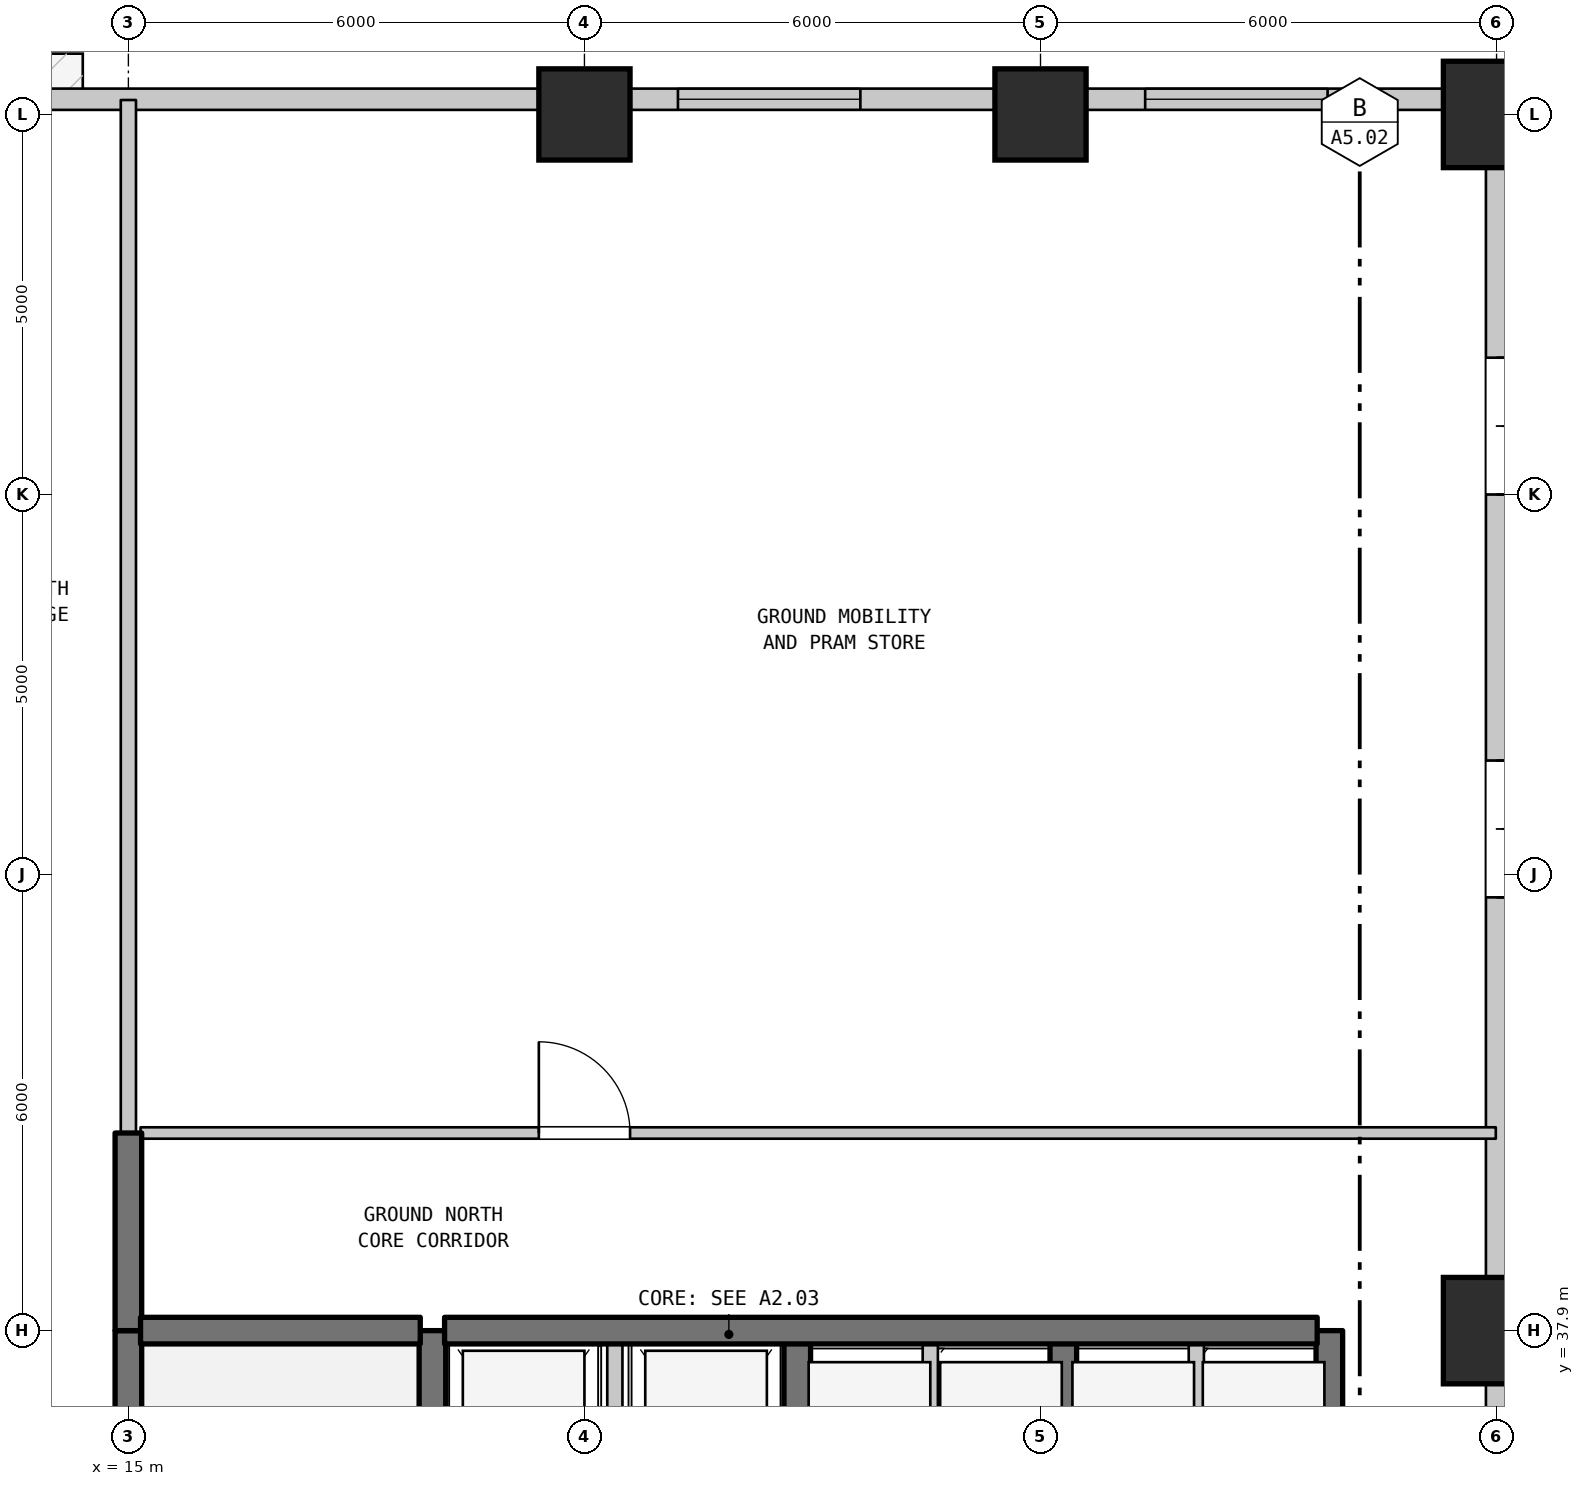
"""IFC4 building model, lengths in metres.
Left out: names, types, materials, properties, quantities, classifications, styles, units other than length and angle.
Written with IfcOpenShell. Run it as: python <this file> out.ifc"""

import sys

from ifc_helpers import new_model, si_unit, direction, frame, frame_2d, origin, origin_2d, place, context, subcontext, project, spatial, rectangle, extrude, element, fill, save


model = new_model("IFC4")
c1 = context("Model", 3, precision=1e-05, world=origin(), true_north=direction((0.0, 1.0)))
c2 = subcontext(c1, "Body", "Model", "MODEL_VIEW")
j1 = project(units=[si_unit("LENGTHUNIT", "METRE"), si_unit("PLANEANGLEUNIT", "RADIAN")], contexts=[c1])
p1 = place(None, origin())
s1 = spatial("IfcSite", under=j1, at=p1, CompositionType="ELEMENT")
p2 = place(p1, origin())
s2 = spatial("IfcBuilding", under=s1, at=p2, CompositionType="ELEMENT")
p3 = place(p2, origin())
s3 = spatial("IfcBuildingStorey", under=s2, at=p3, CompositionType="ELEMENT", Elevation=0.0)
for number, where, z_axis, x_axis in (
    (1, (21.0, 53.9, 0.0), (0.0, 0.0, 1.0), (1.0, 0.0, 0.0)),
    (2, (27.0, 53.9, 0.0), (0.0, 0.0, 1.0), (1.0, 0.0, 0.0)),
):
    element("IfcColumn", number, at=place(p3, frame(where, z_axis=z_axis, x_axis=x_axis)), inside=s3, PredefinedType="PILASTER", context=c2, shape_type="SweptSolid", body=[
        extrude(rectangle(XDim=1.2, YDim=1.2, at=origin_2d()), origin(), (0.0, 0.0, 1.0), 6.5),
    ])
for number, where, z_axis, x_axis in (
    (3, (33.0, 37.9, 0.0), (0.0, 0.0, 1.0), (1.0, 0.0, 0.0)),
    (4, (33.0, 53.9, 0.0), (0.0, 0.0, 1.0), (1.0, 0.0, 0.0)),
):
    element("IfcColumn", number, at=place(p3, frame(where, z_axis=z_axis, x_axis=x_axis)), inside=s3, PredefinedType="PILASTER", context=c2, shape_type="SweptSolid", body=[
        extrude(rectangle(XDim=1.4, YDim=1.4, at=origin_2d()), origin(), (0.0, 0.0, 1.0), 6.5),
    ])
p4 = place(p3, frame((4.414, 54.1, 0.0), z_axis=(0.0, 0.0, 1.0), x_axis=(1.0, 0.0, 0.0)))
e5 = element("IfcWall", 5, at=p4, inside=s3, PredefinedType="STANDARD", context=c2, shape_type="SweptSolid", body=[
    extrude(rectangle(XDim=28.586, YDim=0.28, at=frame_2d((14.293, 0.0))), origin(), (0.0, 0.0, 1.0), 6.17),
])
p5 = place(p4, frame((7.586, 0.0, 0.0)))
e6 = element("IfcOpeningElement", 6, at=p5, cuts=e5, PredefinedType="OPENING", context=c2, shape_type="SweptSolid", body=[
    extrude(rectangle(XDim=1.8, YDim=2.4, at=frame_2d((0.9, 1.2))), frame((0.0, 0.15, 0.0), z_axis=(0.0, -1.0, 0.0), x_axis=(1.0, 0.0, 0.0)), (0.0, 0.0, 1.0), 0.3),
])
p6 = place(p4, frame((2.673, 0.0, 0.9)))
e7 = element("IfcOpeningElement", 7, at=p6, cuts=e5, PredefinedType="OPENING", context=c2, shape_type="SweptSolid", body=[
    extrude(rectangle(XDim=2.4, YDim=2.4, at=frame_2d((1.2, 1.2))), frame((0.0, 0.15, 0.0), z_axis=(0.0, -1.0, 0.0), x_axis=(1.0, 0.0, 0.0)), (0.0, 0.0, 1.0), 0.3),
])
p7 = place(p4, frame((17.816, 0.0, 0.9)))
e8 = element("IfcOpeningElement", 8, at=p7, cuts=e5, PredefinedType="OPENING", context=c2, shape_type="SweptSolid", body=[
    extrude(rectangle(XDim=2.4, YDim=2.4, at=frame_2d((1.2, 1.2))), frame((0.0, 0.15, 0.0), z_axis=(0.0, -1.0, 0.0), x_axis=(1.0, 0.0, 0.0)), (0.0, 0.0, 1.0), 0.3),
])
p8 = place(p4, frame((23.963, 0.0, 0.9)))
e9 = element("IfcOpeningElement", 9, at=p8, cuts=e5, PredefinedType="OPENING", context=c2, shape_type="SweptSolid", body=[
    extrude(rectangle(XDim=2.4, YDim=2.4, at=frame_2d((1.2, 1.2))), frame((0.0, 0.15, 0.0), z_axis=(0.0, -1.0, 0.0), x_axis=(1.0, 0.0, 0.0)), (0.0, 0.0, 1.0), 0.3),
])
p9 = place(p3, frame((33.0, 54.1, 0.0), z_axis=(0.0, 0.0, 1.0), x_axis=(0.0, -1.0, 0.0)))
e10 = element("IfcWall", 10, at=p9, inside=s3, PredefinedType="STANDARD", context=c2, shape_type="SweptSolid", body=[
    extrude(rectangle(XDim=26.2, YDim=0.28, at=frame_2d((13.1, 0.0))), origin(), (0.0, 0.0, 1.0), 5.57),
])
p10 = place(p9, frame((8.7, 0.0, 0.0)))
e11 = element("IfcOpeningElement", 11, at=p10, cuts=e10, PredefinedType="OPENING", context=c2, shape_type="SweptSolid", body=[
    extrude(rectangle(XDim=1.8, YDim=2.4, at=frame_2d((0.9, 1.2))), frame((0.0, 0.15, 0.0), z_axis=(0.0, -1.0, 0.0), x_axis=(1.0, 0.0, 0.0)), (0.0, 0.0, 1.0), 0.3),
])
p11 = place(p9, frame((3.4, 0.0, 0.0)))
e12 = element("IfcOpeningElement", 12, at=p11, cuts=e10, PredefinedType="OPENING", context=c2, shape_type="SweptSolid", body=[
    extrude(rectangle(XDim=1.8, YDim=2.4, at=frame_2d((0.9, 1.2))), frame((0.0, 0.15, 0.0), z_axis=(0.0, -1.0, 0.0), x_axis=(1.0, 0.0, 0.0)), (0.0, 0.0, 1.0), 0.3),
])
p12 = place(p9, frame((22.212, 0.0, 0.9)))
e13 = element("IfcOpeningElement", 13, at=p12, cuts=e10, PredefinedType="OPENING", context=c2, shape_type="SweptSolid", body=[
    extrude(rectangle(XDim=2.4, YDim=2.4, at=frame_2d((1.2, 1.2))), frame((0.0, 0.15, 0.0), z_axis=(0.0, -1.0, 0.0), x_axis=(1.0, 0.0, 0.0)), (0.0, 0.0, 1.0), 0.3),
])
p13 = place(p3, frame((15.0, 31.1, 0.0), z_axis=(0.0, 0.0, 1.0), x_axis=(0.0, 1.0, 0.0)))
e14 = element("IfcWall", 14, at=p13, inside=s3, PredefinedType="SHEAR", context=c2, shape_type="SweptSolid", body=[
    extrude(rectangle(XDim=6.8, YDim=0.35, at=frame_2d((3.4, 0.0))), origin(), (0.0, 0.0, 1.0), 6.17),
])
p14 = place(p13, frame((0.632, 0.0, 0.0)))
e15 = element("IfcOpeningElement", 15, at=p14, cuts=e14, PredefinedType="OPENING", context=c2, shape_type="SweptSolid", body=[
    extrude(rectangle(XDim=1.1, YDim=2.15, at=frame_2d((0.55, 1.075))), frame((0.0, 0.185, 0.0), z_axis=(0.0, -1.0, 0.0), x_axis=(1.0, 0.0, 0.0)), (0.0, 0.0, 1.0), 0.37),
])
p15 = place(p3, frame((15.0, 37.9, 0.0), z_axis=(0.0, 0.0, 1.0), x_axis=(0.0, 1.0, 0.0)))
e16 = element("IfcWall", 16, at=p15, inside=s3, PredefinedType="SHEAR", context=c2, shape_type="SweptSolid", body=[
    extrude(rectangle(XDim=2.6, YDim=0.35, at=frame_2d((1.3, 0.0))), origin(), (0.0, 0.0, 1.0), 6.17),
])
p16 = place(p3, frame((15.0, 40.5, 0.0), z_axis=(0.0, 0.0, 1.0), x_axis=(0.0, 1.0, 0.0)))
e17 = element("IfcWall", 17, at=p16, inside=s3, PredefinedType="STANDARD", context=c2, shape_type="SweptSolid", body=[
    extrude(rectangle(XDim=13.59, YDim=0.2, at=frame_2d((6.795, 0.0))), origin(), (0.0, 0.0, 1.0), 6.17),
])
p17 = place(p3, frame((19.0, 35.0, 0.0), z_axis=(0.0, 0.0, 1.0), x_axis=(0.0, 1.0, 0.0)))
e18 = element("IfcWall", 18, at=p17, inside=s3, PredefinedType="SHEAR", context=c2, shape_type="SweptSolid", body=[
    extrude(rectangle(XDim=2.9, YDim=0.35, at=frame_2d((1.45, 0.0))), origin(), (0.0, 0.0, 1.0), 6.17),
])
p18 = place(p3, frame((21.4, 35.0, 0.0), z_axis=(0.0, 0.0, 1.0), x_axis=(0.0, 1.0, 0.0)))
e19 = element("IfcWall", 19, at=p18, inside=s3, PredefinedType="STANDARD", context=c2, shape_type="SweptSolid", body=[
    extrude(rectangle(XDim=2.9, YDim=0.2, at=frame_2d((1.45, 0.0))), origin(), (0.0, 0.0, 1.0), 6.17),
])
p19 = place(p3, frame((23.8, 35.0, 0.0), z_axis=(0.0, 0.0, 1.0), x_axis=(0.0, 1.0, 0.0)))
e20 = element("IfcWall", 20, at=p19, inside=s3, PredefinedType="SHEAR", context=c2, shape_type="SweptSolid", body=[
    extrude(rectangle(XDim=2.9, YDim=0.35, at=frame_2d((1.45, 0.0))), origin(), (0.0, 0.0, 1.0), 6.17),
])
p20 = place(p3, frame((25.55, 35.0, 0.0), z_axis=(0.0, 0.0, 1.0), x_axis=(0.0, 1.0, 0.0)))
e21 = element("IfcWall", 21, at=p20, inside=s3, PredefinedType="STANDARD", context=c2, shape_type="SweptSolid", body=[
    extrude(rectangle(XDim=2.9, YDim=0.2, at=frame_2d((1.45, 0.0))), origin(), (0.0, 0.0, 1.0), 6.17),
])
p21 = place(p3, frame((27.3, 35.0, 0.0), z_axis=(0.0, 0.0, 1.0), x_axis=(0.0, 1.0, 0.0)))
e22 = element("IfcWall", 22, at=p21, inside=s3, PredefinedType="SHEAR", context=c2, shape_type="SweptSolid", body=[
    extrude(rectangle(XDim=2.9, YDim=0.35, at=frame_2d((1.45, 0.0))), origin(), (0.0, 0.0, 1.0), 6.17),
])
p22 = place(p3, frame((29.05, 35.0, 0.0), z_axis=(0.0, 0.0, 1.0), x_axis=(0.0, 1.0, 0.0)))
e23 = element("IfcWall", 23, at=p22, inside=s3, PredefinedType="STANDARD", context=c2, shape_type="SweptSolid", body=[
    extrude(rectangle(XDim=2.9, YDim=0.2, at=frame_2d((1.45, 0.0))), origin(), (0.0, 0.0, 1.0), 6.17),
])
p23 = place(p3, frame((30.8, 35.0, 0.0), z_axis=(0.0, 0.0, 1.0), x_axis=(0.0, 1.0, 0.0)))
e24 = element("IfcWall", 24, at=p23, inside=s3, PredefinedType="SHEAR", context=c2, shape_type="SweptSolid", body=[
    extrude(rectangle(XDim=2.9, YDim=0.35, at=frame_2d((1.45, 0.0))), origin(), (0.0, 0.0, 1.0), 6.17),
])
p24 = place(p3, frame((15.16, 37.9, 0.0), z_axis=(0.0, 0.0, 1.0), x_axis=(1.0, 0.0, 0.0)))
e25 = element("IfcWall", 25, at=p24, inside=s3, PredefinedType="SHEAR", context=c2, shape_type="SweptSolid", body=[
    extrude(rectangle(XDim=3.68, YDim=0.35, at=frame_2d((1.84, 0.0))), origin(), (0.0, 0.0, 1.0), 6.17),
])
p25 = place(p3, frame((19.16, 37.9, 0.0), z_axis=(0.0, 0.0, 1.0), x_axis=(1.0, 0.0, 0.0)))
e26 = element("IfcWall", 26, at=p25, inside=s3, PredefinedType="SHEAR", context=c2, shape_type="SweptSolid", body=[
    extrude(rectangle(XDim=11.48, YDim=0.35, at=frame_2d((5.74, 0.0))), origin(), (0.0, 0.0, 1.0), 6.17),
])
p26 = place(p3, frame((15.16, 40.5, 0.0), z_axis=(0.0, 0.0, 1.0), x_axis=(1.0, 0.0, 0.0)))
e27 = element("IfcWall", 27, at=p26, inside=s3, PredefinedType="STANDARD", context=c2, shape_type="SweptSolid", body=[
    extrude(rectangle(XDim=17.83, YDim=0.15, at=frame_2d((8.915, 0.0))), origin(), (0.0, 0.0, 1.0), 6.17),
])
p27 = place(p26, frame((5.24, 0.0, 0.0)))
e28 = element("IfcOpeningElement", 28, at=p27, cuts=e27, PredefinedType="OPENING", context=c2, shape_type="SweptSolid", body=[
    extrude(rectangle(XDim=1.2, YDim=2.2, at=frame_2d((0.6, 1.1))), frame((0.0, 0.085, 0.0), z_axis=(0.0, -1.0, 0.0), x_axis=(1.0, 0.0, 0.0)), (0.0, 0.0, 1.0), 0.17),
])
p28 = place(p7, origin())
e29 = element("IfcWindow", 29, at=p28, inside=s3, PartitioningType="DOUBLE_PANEL_VERTICAL", PredefinedType="WINDOW", context=c2, shape_type="SweptSolid", body=[
    extrude(rectangle(XDim=2.4, YDim=2.4, at=frame_2d((1.2, 1.2))), frame((0.0, 0.03, 0.0), z_axis=(0.0, -1.0, 0.0), x_axis=(1.0, 0.0, 0.0)), (0.0, 0.0, 1.0), 0.06),
])
fill(e8, e29)
p29 = place(p8, origin())
e30 = element("IfcWindow", 30, at=p29, inside=s3, PartitioningType="DOUBLE_PANEL_VERTICAL", PredefinedType="WINDOW", context=c2, shape_type="SweptSolid", body=[
    extrude(rectangle(XDim=2.4, YDim=2.4, at=frame_2d((1.2, 1.2))), frame((0.0, 0.03, 0.0), z_axis=(0.0, -1.0, 0.0), x_axis=(1.0, 0.0, 0.0)), (0.0, 0.0, 1.0), 0.06),
])
fill(e9, e30)
p30 = place(p10, origin())
e31 = element("IfcDoor", 31, at=p30, inside=s3, OperationType="DOUBLE_DOOR_SINGLE_SWING", PredefinedType="DOOR", context=c2, shape_type="SweptSolid", body=[
    extrude(rectangle(XDim=1.8, YDim=2.4, at=frame_2d((0.9, 1.2))), frame((0.0, 0.025, 0.0), z_axis=(0.0, -1.0, 0.0), x_axis=(1.0, 0.0, 0.0)), (0.0, 0.0, 1.0), 0.05),
])
fill(e11, e31)
p31 = place(p11, origin())
e32 = element("IfcDoor", 32, at=p31, inside=s3, OperationType="DOUBLE_DOOR_SINGLE_SWING", PredefinedType="DOOR", context=c2, shape_type="SweptSolid", body=[
    extrude(rectangle(XDim=1.8, YDim=2.4, at=frame_2d((0.9, 1.2))), frame((0.0, 0.025, 0.0), z_axis=(0.0, -1.0, 0.0), x_axis=(1.0, 0.0, 0.0)), (0.0, 0.0, 1.0), 0.05),
])
fill(e12, e32)
p32 = place(p27, origin())
e33 = element("IfcDoor", 33, at=p32, inside=s3, OperationType="SINGLE_SWING_LEFT", PredefinedType="DOOR", context=c2, shape_type="SweptSolid", body=[
    extrude(rectangle(XDim=1.2, YDim=2.2, at=frame_2d((0.6, 1.1))), frame((0.0, 0.025, 0.0), z_axis=(0.0, -1.0, 0.0), x_axis=(1.0, 0.0, 0.0)), (0.0, 0.0, 1.0), 0.05),
])
fill(e28, e33)
save(model, sys.argv[1])
